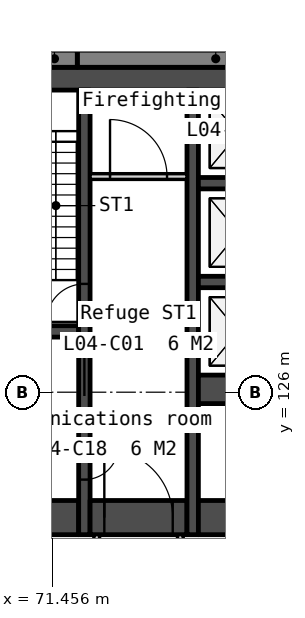
"""IFC4 building model, lengths in metres.
Left out: names, types, materials, properties, quantities, classifications, styles, units other than length and angle.
Written with IfcOpenShell. Run it as: python <this file> out.ifc"""

import sys

from ifc_helpers import new_model, si_unit, direction, frame, frame_2d, origin, place, context, subcontext, project, spatial, rectangle, extrude, element, fill, save


model = new_model("IFC4")
c1 = context("Model", 3, precision=1e-05, world=origin(), true_north=direction((0.0, 1.0)))
c2 = subcontext(c1, "Body", "Model", "MODEL_VIEW")
j1 = project(units=[si_unit("LENGTHUNIT", "METRE"), si_unit("PLANEANGLEUNIT", "RADIAN")], contexts=[c1])
p1 = place(None, origin())
s1 = spatial("IfcSite", under=j1, at=p1, CompositionType="ELEMENT")
p2 = place(p1, origin())
s2 = spatial("IfcBuilding", under=s1, at=p2, CompositionType="ELEMENT")
p3 = place(p2, frame((0.0, 0.0, 25.0)))
s3 = spatial("IfcBuildingStorey", under=s2, at=p3, CompositionType="ELEMENT", Elevation=25.0)
p4 = place(p3, frame((66.0, 134.25, 0.0), z_axis=(0.0, 0.0, 1.0), x_axis=(1.0, 0.0, 0.0)))
e1 = element("IfcWall", 1, at=p4, inside=s3, PredefinedType="SOLIDWALL", context=c2, shape_type="SweptSolid", body=[
    extrude(rectangle(XDim=28.0, YDim=0.6, at=frame_2d((14.0, 0.0))), origin(), (0.0, 0.0, 1.0), 4.7),
])
for number, where, z_axis, x_axis in (
    (2, (69.6, 127.6, 0.0), (0.0, 0.0, 1.0), (1.0, 0.0, 0.0)),
    (3, (69.6, 125.3, 0.0), (0.0, 0.0, 1.0), (1.0, 0.0, 0.0)),
):
    element("IfcWall", number, at=place(p3, frame(where, z_axis=z_axis, x_axis=x_axis)), inside=s3, PredefinedType="SOLIDWALL", context=c2, shape_type="SweptSolid", body=[
        extrude(rectangle(XDim=2.55, YDim=0.3, at=frame_2d((1.275, 0.0))), origin(), (0.0, 0.0, 1.0), 4.7),
    ])
p5 = place(p3, frame((69.6, 122.7, 0.0), z_axis=(0.0, 0.0, 1.0), x_axis=(1.0, 0.0, 0.0)))
e4 = element("IfcWall", 4, at=p5, inside=s3, PredefinedType="SOLIDWALL", context=c2, shape_type="SweptSolid", body=[
    extrude(rectangle(XDim=2.55, YDim=0.9, at=frame_2d((1.275, 0.0))), origin(), (0.0, 0.0, 1.0), 4.7),
])
p6 = place(p3, frame((72.3, 133.95, 0.0), z_axis=(0.0, 0.0, 1.0), x_axis=(0.0, -1.0, 0.0)))
e5 = element("IfcWall", 5, at=p6, inside=s3, PredefinedType="SOLIDWALL", context=c2, shape_type="SweptSolid", body=[
    extrude(rectangle(XDim=11.7, YDim=0.3, at=frame_2d((5.85, 0.0))), origin(), (0.0, 0.0, 1.0), 4.7),
])
p7 = place(p6, frame((6.95, 0.0, 0.0)))
e6 = element("IfcOpeningElement", 6, at=p7, cuts=e5, PredefinedType="OPENING", context=c2, shape_type="SweptSolid", body=[
    extrude(rectangle(XDim=1.1, YDim=2.1, at=frame_2d((0.55, 1.05))), frame((0.0, 0.16, 0.0), z_axis=(0.0, -1.0, 0.0), x_axis=(1.0, 0.0, 0.0)), (0.0, 0.0, 1.0), 0.32),
])
p8 = place(p6, frame((9.35, 0.0, 0.0)))
e7 = element("IfcOpeningElement", 7, at=p8, cuts=e5, PredefinedType="OPENING", context=c2, shape_type="SweptSolid", body=[
    extrude(rectangle(XDim=0.9, YDim=2.1, at=frame_2d((0.45, 1.05))), frame((0.0, 0.16, 0.0), z_axis=(0.0, -1.0, 0.0), x_axis=(1.0, 0.0, 0.0)), (0.0, 0.0, 1.0), 0.32),
])
p9 = place(p6, frame((5.1, 0.0, 0.0)))
e8 = element("IfcOpeningElement", 8, at=p9, cuts=e5, PredefinedType="OPENING", context=c2, shape_type="SweptSolid", body=[
    extrude(rectangle(XDim=1.0, YDim=2.1, at=frame_2d((0.5, 1.05))), frame((0.0, 0.16, 0.0), z_axis=(0.0, -1.0, 0.0), x_axis=(1.0, 0.0, 0.0)), (0.0, 0.0, 1.0), 0.32),
])
p10 = place(p3, frame((72.45, 131.675, 0.0), z_axis=(0.0, 0.0, 1.0), x_axis=(1.0, 0.0, 0.0)))
e9 = element("IfcWall", 9, at=p10, inside=s3, PredefinedType="PARTITIONING", context=c2, shape_type="SweptSolid", body=[
    extrude(rectangle(XDim=2.55, YDim=0.15, at=frame_2d((1.275, 0.0))), origin(), (0.0, 0.0, 1.0), 4.7),
])
p11 = place(p10, frame((0.525, 0.0, 0.0)))
e10 = element("IfcOpeningElement", 10, at=p11, cuts=e9, PredefinedType="OPENING", context=c2, shape_type="SweptSolid", body=[
    extrude(rectangle(XDim=1.5, YDim=2.1, at=frame_2d((0.75, 1.05))), frame((0.0, 0.085, 0.0), z_axis=(0.0, -1.0, 0.0), x_axis=(1.0, 0.0, 0.0)), (0.0, 0.0, 1.0), 0.17),
])
p12 = place(p3, frame((72.45, 122.7, 0.0), z_axis=(0.0, 0.0, 1.0), x_axis=(1.0, 0.0, 0.0)))
e11 = element("IfcWall", 11, at=p12, inside=s3, PredefinedType="SOLIDWALL", context=c2, shape_type="SweptSolid", body=[
    extrude(rectangle(XDim=2.55, YDim=0.9, at=frame_2d((1.275, 0.0))), origin(), (0.0, 0.0, 1.0), 4.7),
])
p13 = place(p12, frame((0.375, 0.0, 0.0)))
e12 = element("IfcOpeningElement", 12, at=p13, cuts=e11, PredefinedType="OPENING", context=c2, shape_type="SweptSolid", body=[
    extrude(rectangle(XDim=1.8, YDim=2.1, at=frame_2d((0.9, 1.05))), frame((0.0, 0.46, 0.0), z_axis=(0.0, -1.0, 0.0), x_axis=(1.0, 0.0, 0.0)), (0.0, 0.0, 1.0), 0.92),
])
for number, where, z_axis, x_axis in (
    (13, (72.625, 122.25, 0.0), (0.0, 0.0, 1.0), (0.0, -1.0, 0.0)),
    (14, (74.825, 122.25, 0.0), (0.0, 0.0, 1.0), (0.0, -1.0, 0.0)),
):
    element("IfcWall", number, at=place(p3, frame(where, z_axis=z_axis, x_axis=x_axis)), inside=s3, PredefinedType="PARTITIONING", context=c2, shape_type="SweptSolid", body=[
        extrude(rectangle(XDim=2.1, YDim=0.15, at=frame_2d((1.05, 0.0))), origin(), (0.0, 0.0, 1.0), 4.7),
    ])
p14 = place(p3, frame((75.15, 133.95, 0.0), z_axis=(0.0, 0.0, 1.0), x_axis=(0.0, -1.0, 0.0)))
e15 = element("IfcWall", 15, at=p14, inside=s3, PredefinedType="SOLIDWALL", context=c2, shape_type="SweptSolid", body=[
    extrude(rectangle(XDim=11.7, YDim=0.3, at=frame_2d((5.85, 0.0))), origin(), (0.0, 0.0, 1.0), 4.7),
])
for number, where, z_axis, x_axis in (
    (16, (75.3, 131.5, 0.0), (0.0, 0.0, 1.0), (1.0, 0.0, 0.0)),
    (17, (75.3, 128.9, 0.0), (0.0, 0.0, 1.0), (1.0, 0.0, 0.0)),
):
    element("IfcWall", number, at=place(p3, frame(where, z_axis=z_axis, x_axis=x_axis)), inside=s3, PredefinedType="SOLIDWALL", context=c2, shape_type="SweptSolid", body=[
        extrude(rectangle(XDim=2.1, YDim=0.3, at=frame_2d((1.05, 0.0))), origin(), (0.0, 0.0, 1.0), 4.7),
    ])
p15 = place(p3, frame((75.3, 126.075, 0.0), z_axis=(0.0, 0.0, 1.0), x_axis=(1.0, 0.0, 0.0)))
e18 = element("IfcWall", 18, at=p15, inside=s3, PredefinedType="SOLIDWALL", context=c2, shape_type="SweptSolid", body=[
    extrude(rectangle(XDim=2.1, YDim=0.75, at=frame_2d((1.05, 0.0))), origin(), (0.0, 0.0, 1.0), 4.7),
])
p16 = place(p3, frame((75.3, 122.7, 0.0), z_axis=(0.0, 0.0, 1.0), x_axis=(1.0, 0.0, 0.0)))
e19 = element("IfcWall", 19, at=p16, inside=s3, PredefinedType="SOLIDWALL", context=c2, shape_type="SweptSolid", body=[
    extrude(rectangle(XDim=6.2, YDim=0.9, at=frame_2d((3.1, 0.0))), origin(), (0.0, 0.0, 1.0), 4.7),
])
p17 = place(p3, frame((79.4, 134.775, -0.25), z_axis=(0.0, 0.0, 1.0), x_axis=(-1.0, 0.0, 0.0)))
e20 = element("IfcWall", 20, at=p17, inside=s3, PredefinedType="SOLIDWALL", context=c2, shape_type="SweptSolid", body=[
    extrude(rectangle(XDim=7.287, YDim=0.45, at=frame_2d((3.643, 0.0))), origin(), (0.0, 0.0, 1.0), 4.262),
])
p18 = place(p3, frame((72.113, 134.775, -0.25), z_axis=(0.0, 0.0, 1.0), x_axis=(-1.0, 0.0, 0.0)))
e21 = element("IfcWall", 21, at=p18, inside=s3, PredefinedType="SOLIDWALL", context=c2, shape_type="SweptSolid", body=[
    extrude(rectangle(XDim=1.2, YDim=0.45, at=frame_2d((0.6, 0.0))), origin(), (0.0, 0.0, 1.0), 4.262),
])
p19 = place(p3, frame((77.166, 61.679, 0.0), z_axis=(0.0, 0.0, 1.0), x_axis=(-0.500000102728, 0.866025344474, 0.0)))
e22 = element("IfcWall", 22, at=p19, inside=s3, PredefinedType="STANDARD", context=c2, shape_type="SweptSolid", body=[
    extrude(rectangle(XDim=77.841, YDim=1.0, at=frame_2d((38.92, 0.0))), origin(), (0.0, 0.0, 1.0), 0.6),
])
p20 = place(p7, origin())
e23 = element("IfcDoor", 23, at=p20, inside=s3, OperationType="SLIDING_TO_LEFT", PredefinedType="DOOR", context=c2, shape_type="SweptSolid", body=[
    extrude(rectangle(XDim=1.1, YDim=2.1, at=frame_2d((0.55, 1.05))), frame((0.0, 0.025, 0.0), z_axis=(0.0, -1.0, 0.0), x_axis=(1.0, 0.0, 0.0)), (0.0, 0.0, 1.0), 0.05),
])
fill(e6, e23)
p21 = place(p13, origin())
e24 = element("IfcDoor", 24, at=p21, inside=s3, OperationType="DOUBLE_DOOR_DOUBLE_SWING", PredefinedType="DOOR", context=c2, shape_type="SweptSolid", body=[
    extrude(rectangle(XDim=1.8, YDim=2.1, at=frame_2d((0.9, 1.05))), frame((0.0, 0.025, 0.0), z_axis=(0.0, -1.0, 0.0), x_axis=(1.0, 0.0, 0.0)), (0.0, 0.0, 1.0), 0.05),
])
fill(e12, e24)
p22 = place(p11, origin())
e25 = element("IfcDoor", 25, at=p22, inside=s3, OperationType="DOUBLE_DOOR_DOUBLE_SWING", PredefinedType="DOOR", context=c2, shape_type="SweptSolid", body=[
    extrude(rectangle(XDim=1.5, YDim=2.1, at=frame_2d((0.75, 1.05))), frame((0.0, 0.025, 0.0), z_axis=(0.0, -1.0, 0.0), x_axis=(1.0, 0.0, 0.0)), (0.0, 0.0, 1.0), 0.05),
])
fill(e10, e25)
p23 = place(p8, origin())
e26 = element("IfcDoor", 26, at=p23, inside=s3, OperationType="SINGLE_SWING_LEFT", PredefinedType="DOOR", context=c2, shape_type="SweptSolid", body=[
    extrude(rectangle(XDim=0.9, YDim=2.1, at=frame_2d((0.45, 1.05))), frame((0.0, 0.025, 0.0), z_axis=(0.0, -1.0, 0.0), x_axis=(1.0, 0.0, 0.0)), (0.0, 0.0, 1.0), 0.05),
])
fill(e7, e26)
p24 = place(p9, origin())
e27 = element("IfcDoor", 27, at=p24, inside=s3, OperationType="SINGLE_SWING_RIGHT", PredefinedType="DOOR", context=c2, shape_type="SweptSolid", body=[
    extrude(rectangle(XDim=1.0, YDim=2.1, at=frame_2d((0.5, 1.05))), frame((0.0, 0.025, 0.0), z_axis=(0.0, -1.0, 0.0), x_axis=(1.0, 0.0, 0.0)), (0.0, 0.0, 1.0), 0.05),
])
fill(e8, e27)
save(model, sys.argv[1])
